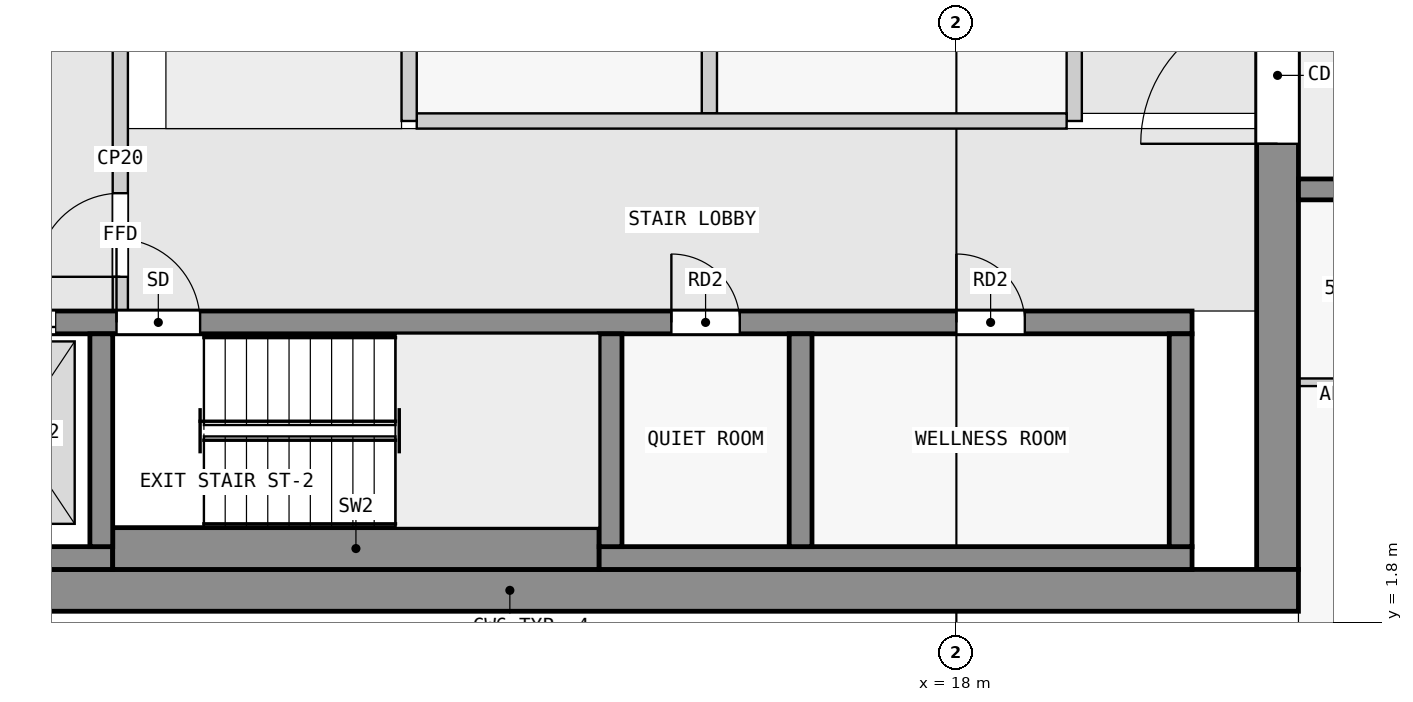
"""IFC4 building model, lengths in metres.
Left out: names, types, materials, properties, quantities, classifications, styles, units other than length and angle.
Written with IfcOpenShell. Run it as: python <this file> out.ifc"""

import sys

from ifc_helpers import new_model, si_unit, direction, frame, frame_2d, origin, place, context, subcontext, project, spatial, rectangle, extrude, element, fill, save


model = new_model("IFC4")
c1 = context("Model", 3, precision=1e-05, world=origin(), true_north=direction((0.0, 1.0)))
c2 = subcontext(c1, "Body", "Model", "MODEL_VIEW")
j1 = project(units=[si_unit("LENGTHUNIT", "METRE"), si_unit("PLANEANGLEUNIT", "RADIAN")], contexts=[c1])
p1 = place(None, origin())
s1 = spatial("IfcSite", under=j1, at=p1, CompositionType="ELEMENT")
p2 = place(p1, origin())
s2 = spatial("IfcBuilding", under=s1, at=p2, CompositionType="ELEMENT")
p3 = place(p2, frame((0.0, 0.0, 194.4)))
s3 = spatial("IfcBuildingStorey", under=s2, at=p3, CompositionType="ELEMENT", Elevation=194.4)
p4 = place(p3, frame((1.75, 2.225, 0.0), z_axis=(0.0, 0.0, 1.0), x_axis=(1.0, 0.0, 0.0)))
e1 = element("IfcWall", 1, at=p4, inside=s3, PredefinedType="SHEAR", context=c2, shape_type="SweptSolid", body=[
    extrude(rectangle(XDim=20.75, YDim=0.55, at=frame_2d((10.375, 0.0))), origin(), (0.0, 0.0, 1.0), 3.25),
])
p5 = place(p3, frame((22.225, 2.5, 0.0), z_axis=(0.0, 0.0, 1.0), x_axis=(0.0, 1.0, 0.0)))
e2 = element("IfcWall", 2, at=p5, inside=s3, PredefinedType="SHEAR", context=c2, shape_type="SweptSolid", body=[
    extrude(rectangle(XDim=14.95, YDim=0.55, at=frame_2d((7.475, 0.0))), origin(), (0.0, 0.0, 1.0), 3.25),
])
p6 = place(p5, frame((5.6, 0.0, 0.0)))
e3 = element("IfcOpeningElement", 3, at=p6, cuts=e2, PredefinedType="OPENING", context=c2, shape_type="SweptSolid", body=[
    extrude(rectangle(XDim=1.8, YDim=2.1, at=frame_2d((0.9, 1.05))), frame((0.0, 0.285, 0.0), z_axis=(0.0, -1.0, 0.0), x_axis=(1.0, 0.0, 0.0)), (0.0, 0.0, 1.0), 0.57),
])
p7 = place(p3, frame((2.3, 2.65, 0.0), z_axis=(0.0, 0.0, 1.0), x_axis=(1.0, 0.0, 0.0)))
e4 = element("IfcWall", 4, at=p7, inside=s3, PredefinedType="SHEAR", context=c2, shape_type="SweptSolid", body=[
    extrude(rectangle(XDim=4.6, YDim=0.3, at=frame_2d((2.3, 0.0))), origin(), (0.0, 0.0, 1.0), 3.25),
])
p8 = place(p3, frame((6.9, 2.775, 0.0), z_axis=(0.0, 0.0, 1.0), x_axis=(1.0, 0.0, 0.0)))
e5 = element("IfcWall", 5, at=p8, inside=s3, PredefinedType="SHEAR", context=c2, shape_type="SweptSolid", body=[
    extrude(rectangle(XDim=6.4, YDim=0.55, at=frame_2d((3.2, 0.0))), origin(), (0.0, 0.0, 1.0), 3.25),
])
p9 = place(p3, frame((13.3, 2.65, 0.0), z_axis=(0.0, 0.0, 1.0), x_axis=(1.0, 0.0, 0.0)))
e6 = element("IfcWall", 6, at=p9, inside=s3, PredefinedType="SHEAR", context=c2, shape_type="SweptSolid", body=[
    extrude(rectangle(XDim=7.8, YDim=0.3, at=frame_2d((3.9, 0.0))), origin(), (0.0, 0.0, 1.0), 3.25),
])
for number, where, z_axis, x_axis in (
    (7, (6.75, 2.8, 0.0), (0.0, 0.0, 1.0), (0.0, 1.0, 0.0)),
    (8, (13.45, 2.8, 0.0), (0.0, 0.0, 1.0), (0.0, 1.0, 0.0)),
    (9, (15.95, 2.8, 0.0), (0.0, 0.0, 1.0), (0.0, 1.0, 0.0)),
    (10, (20.95, 2.8, 0.0), (0.0, 0.0, 1.0), (0.0, 1.0, 0.0)),
):
    element("IfcWall", number, at=place(p3, frame(where, z_axis=z_axis, x_axis=x_axis)), inside=s3, PredefinedType="SHEAR", context=c2, shape_type="SweptSolid", body=[
        extrude(rectangle(XDim=2.8, YDim=0.3, at=frame_2d((1.4, 0.0))), origin(), (0.0, 0.0, 1.0), 3.25),
    ])
p10 = place(p3, frame((2.3, 5.75, 0.0), z_axis=(0.0, 0.0, 1.0), x_axis=(1.0, 0.0, 0.0)))
e11 = element("IfcWall", 11, at=p10, inside=s3, PredefinedType="SHEAR", context=c2, shape_type="SweptSolid", body=[
    extrude(rectangle(XDim=18.8, YDim=0.3, at=frame_2d((9.4, 0.0))), origin(), (0.0, 0.0, 1.0), 3.25),
])
p11 = place(p10, frame((4.65, 0.0, 0.0)))
e12 = element("IfcOpeningElement", 12, at=p11, cuts=e11, PredefinedType="OPENING", context=c2, shape_type="SweptSolid", body=[
    extrude(rectangle(XDim=1.1, YDim=2.1, at=frame_2d((0.55, 1.05))), frame((0.0, 0.16, 0.0), z_axis=(0.0, -1.0, 0.0), x_axis=(1.0, 0.0, 0.0)), (0.0, 0.0, 1.0), 0.32),
])
p12 = place(p10, frame((0.45, 0.0, 0.0)))
e13 = element("IfcOpeningElement", 13, at=p12, cuts=e11, PredefinedType="OPENING", context=c2, shape_type="SweptSolid", body=[
    extrude(rectangle(XDim=1.1, YDim=2.1, at=frame_2d((0.55, 1.05))), frame((0.0, 0.16, 0.0), z_axis=(0.0, -1.0, 0.0), x_axis=(1.0, 0.0, 0.0)), (0.0, 0.0, 1.0), 0.32),
])
p13 = place(p10, frame((2.75, 0.0, 0.0)))
e14 = element("IfcOpeningElement", 14, at=p13, cuts=e11, PredefinedType="OPENING", context=c2, shape_type="SweptSolid", body=[
    extrude(rectangle(XDim=1.1, YDim=2.1, at=frame_2d((0.55, 1.05))), frame((0.0, 0.16, 0.0), z_axis=(0.0, -1.0, 0.0), x_axis=(1.0, 0.0, 0.0)), (0.0, 0.0, 1.0), 0.32),
])
p14 = place(p10, frame((11.95, 0.0, 0.0)))
e15 = element("IfcOpeningElement", 15, at=p14, cuts=e11, PredefinedType="OPENING", context=c2, shape_type="SweptSolid", body=[
    extrude(rectangle(XDim=0.9, YDim=2.1, at=frame_2d((0.45, 1.05))), frame((0.0, 0.16, 0.0), z_axis=(0.0, -1.0, 0.0), x_axis=(1.0, 0.0, 0.0)), (0.0, 0.0, 1.0), 0.32),
])
p15 = place(p10, frame((15.7, 0.0, 0.0)))
e16 = element("IfcOpeningElement", 16, at=p15, cuts=e11, PredefinedType="OPENING", context=c2, shape_type="SweptSolid", body=[
    extrude(rectangle(XDim=0.9, YDim=2.1, at=frame_2d((0.45, 1.05))), frame((0.0, 0.16, 0.0), z_axis=(0.0, -1.0, 0.0), x_axis=(1.0, 0.0, 0.0)), (0.0, 0.0, 1.0), 0.32),
])
p16 = place(p3, frame((22.5, 7.5, 0.0), z_axis=(0.0, 0.0, 1.0), x_axis=(1.0, 0.0, 0.0)))
e17 = element("IfcWall", 17, at=p16, inside=s3, PredefinedType="SHEAR", context=c2, shape_type="SweptSolid", body=[
    extrude(rectangle(XDim=22.5, YDim=0.275, at=frame_2d((11.25, 0.0))), origin(), (0.0, 0.0, 1.0), 3.25),
])
p17 = place(p16, frame((1.75, 0.0, 0.0)))
e18 = element("IfcOpeningElement", 18, at=p17, cuts=e17, PredefinedType="OPENING", context=c2, shape_type="SweptSolid", body=[
    extrude(rectangle(XDim=1.0, YDim=2.1, at=frame_2d((0.5, 1.05))), frame((0.0, 0.147, 0.0), z_axis=(0.0, -1.0, 0.0), x_axis=(1.0, 0.0, 0.0)), (0.0, 0.0, 1.0), 0.295),
])
p18 = place(p16, frame((5.85, 0.0, 0.0)))
e19 = element("IfcOpeningElement", 19, at=p18, cuts=e17, PredefinedType="OPENING", context=c2, shape_type="SweptSolid", body=[
    extrude(rectangle(XDim=1.8, YDim=2.1, at=frame_2d((0.9, 1.05))), frame((0.0, 0.147, 0.0), z_axis=(0.0, -1.0, 0.0), x_axis=(1.0, 0.0, 0.0)), (0.0, 0.0, 1.0), 0.295),
])
p19 = place(p16, frame((10.75, 0.0, 0.0)))
e20 = element("IfcOpeningElement", 20, at=p19, cuts=e17, PredefinedType="OPENING", context=c2, shape_type="SweptSolid", body=[
    extrude(rectangle(XDim=1.0, YDim=2.1, at=frame_2d((0.5, 1.05))), frame((0.0, 0.147, 0.0), z_axis=(0.0, -1.0, 0.0), x_axis=(1.0, 0.0, 0.0)), (0.0, 0.0, 1.0), 0.295),
])
p20 = place(p16, frame((16.85, 0.0, 0.0)))
e21 = element("IfcOpeningElement", 21, at=p20, cuts=e17, PredefinedType="OPENING", context=c2, shape_type="SweptSolid", body=[
    extrude(rectangle(XDim=1.0, YDim=2.1, at=frame_2d((0.5, 1.05))), frame((0.0, 0.147, 0.0), z_axis=(0.0, -1.0, 0.0), x_axis=(1.0, 0.0, 0.0)), (0.0, 0.0, 1.0), 0.295),
])
p21 = place(p3, frame((7.0, 5.9, 0.0), z_axis=(0.0, 0.0, 1.0), x_axis=(0.0, 1.0, 0.0)))
e22 = element("IfcWall", 22, at=p21, inside=s3, PredefinedType="PARTITIONING", context=c2, shape_type="SweptSolid", body=[
    extrude(rectangle(XDim=4.0, YDim=0.2, at=frame_2d((2.0, 0.0))), origin(), (0.0, 0.0, 1.0), 3.25),
])
p22 = place(p21, frame((0.45, 0.0, 0.0)))
e23 = element("IfcOpeningElement", 23, at=p22, cuts=e22, PredefinedType="OPENING", context=c2, shape_type="SweptSolid", body=[
    extrude(rectangle(XDim=1.1, YDim=2.1, at=frame_2d((0.55, 1.05))), frame((0.0, 0.11, 0.0), z_axis=(0.0, -1.0, 0.0), x_axis=(1.0, 0.0, 0.0)), (0.0, 0.0, 1.0), 0.22),
])
p23 = place(p3, frame((10.8, 8.4, 0.0), z_axis=(0.0, 0.0, 1.0), x_axis=(0.0, 1.0, 0.0)))
e24 = element("IfcWall", 24, at=p23, inside=s3, PredefinedType="PARTITIONING", context=c2, shape_type="SweptSolid", body=[
    extrude(rectangle(XDim=3.8, YDim=0.2, at=frame_2d((1.9, 0.0))), origin(), (0.0, 0.0, 1.0), 3.25),
])
p24 = place(p3, frame((10.9, 8.4, 0.0), z_axis=(0.0, 0.0, 1.0), x_axis=(1.0, 0.0, 0.0)))
e25 = element("IfcWall", 25, at=p24, inside=s3, PredefinedType="PARTITIONING", context=c2, shape_type="SweptSolid", body=[
    extrude(rectangle(XDim=8.55, YDim=0.2, at=frame_2d((4.275, 0.0))), origin(), (0.0, 0.0, 1.0), 3.25),
])
p25 = place(p3, frame((19.55, 8.4, 0.0), z_axis=(0.0, 0.0, 1.0), x_axis=(0.0, 1.0, 0.0)))
e26 = element("IfcWall", 26, at=p25, inside=s3, PredefinedType="PARTITIONING", context=c2, shape_type="SweptSolid", body=[
    extrude(rectangle(XDim=3.8, YDim=0.2, at=frame_2d((1.9, 0.0))), origin(), (0.0, 0.0, 1.0), 3.25),
])
p26 = place(p3, frame((14.75, 8.5, 0.0), z_axis=(0.0, 0.0, 1.0), x_axis=(0.0, 1.0, 0.0)))
e27 = element("IfcWall", 27, at=p26, inside=s3, PredefinedType="PARTITIONING", context=c2, shape_type="SweptSolid", body=[
    extrude(rectangle(XDim=3.6, YDim=0.2, at=frame_2d((1.8, 0.0))), origin(), (0.0, 0.0, 1.0), 3.25),
])
p27 = place(p3, frame((22.5, 4.962, 0.0), z_axis=(0.0, 0.0, 1.0), x_axis=(1.0, 0.0, 0.0)))
e28 = element("IfcWall", 28, at=p27, inside=s3, PredefinedType="PARTITIONING", context=c2, shape_type="SweptSolid", body=[
    extrude(rectangle(XDim=1.45, YDim=0.1, at=frame_2d((0.725, 0.0))), origin(), (0.0, 0.0, 1.0), 3.25),
])
p28 = place(p22, origin())
e29 = element("IfcDoor", 29, at=p28, inside=s3, OperationType="SINGLE_SWING_LEFT", PredefinedType="DOOR", context=c2, shape_type="SweptSolid", body=[
    extrude(rectangle(XDim=1.1, YDim=2.1, at=frame_2d((0.55, 1.05))), frame((0.0, 0.025, 0.0), z_axis=(0.0, -1.0, 0.0), x_axis=(1.0, 0.0, 0.0)), (0.0, 0.0, 1.0), 0.05),
])
fill(e23, e29)
p29 = place(p11, origin())
e30 = element("IfcDoor", 30, at=p29, inside=s3, OperationType="SINGLE_SWING_LEFT", PredefinedType="DOOR", context=c2, shape_type="SweptSolid", body=[
    extrude(rectangle(XDim=1.1, YDim=2.1, at=frame_2d((0.55, 1.05))), frame((0.0, 0.025, 0.0), z_axis=(0.0, -1.0, 0.0), x_axis=(1.0, 0.0, 0.0)), (0.0, 0.0, 1.0), 0.05),
])
fill(e12, e30)
p30 = place(p13, origin())
e31 = element("IfcDoor", 31, at=p30, inside=s3, OperationType="DOUBLE_DOOR_SLIDING", PredefinedType="DOOR", context=c2, shape_type="SweptSolid", body=[
    extrude(rectangle(XDim=1.1, YDim=2.1, at=frame_2d((0.55, 1.05))), frame((0.0, 0.025, 0.0), z_axis=(0.0, -1.0, 0.0), x_axis=(1.0, 0.0, 0.0)), (0.0, 0.0, 1.0), 0.05),
])
fill(e14, e31)
p31 = place(p6, origin())
e32 = element("IfcDoor", 32, at=p31, inside=s3, OperationType="DOUBLE_DOOR_SINGLE_SWING", PredefinedType="DOOR", context=c2, shape_type="SweptSolid", body=[
    extrude(rectangle(XDim=1.8, YDim=2.1, at=frame_2d((0.9, 1.05))), frame((0.0, 0.025, 0.0), z_axis=(0.0, -1.0, 0.0), x_axis=(1.0, 0.0, 0.0)), (0.0, 0.0, 1.0), 0.05),
])
fill(e3, e32)
p32 = place(p14, origin())
e33 = element("IfcDoor", 33, at=p32, inside=s3, OperationType="SINGLE_SWING_LEFT", PredefinedType="DOOR", context=c2, shape_type="SweptSolid", body=[
    extrude(rectangle(XDim=0.9, YDim=2.1, at=frame_2d((0.45, 1.05))), frame((0.0, 0.025, 0.0), z_axis=(0.0, -1.0, 0.0), x_axis=(1.0, 0.0, 0.0)), (0.0, 0.0, 1.0), 0.05),
])
fill(e15, e33)
p33 = place(p15, origin())
e34 = element("IfcDoor", 34, at=p33, inside=s3, OperationType="SINGLE_SWING_LEFT", PredefinedType="DOOR", context=c2, shape_type="SweptSolid", body=[
    extrude(rectangle(XDim=0.9, YDim=2.1, at=frame_2d((0.45, 1.05))), frame((0.0, 0.025, 0.0), z_axis=(0.0, -1.0, 0.0), x_axis=(1.0, 0.0, 0.0)), (0.0, 0.0, 1.0), 0.05),
])
fill(e16, e34)
save(model, sys.argv[1])
